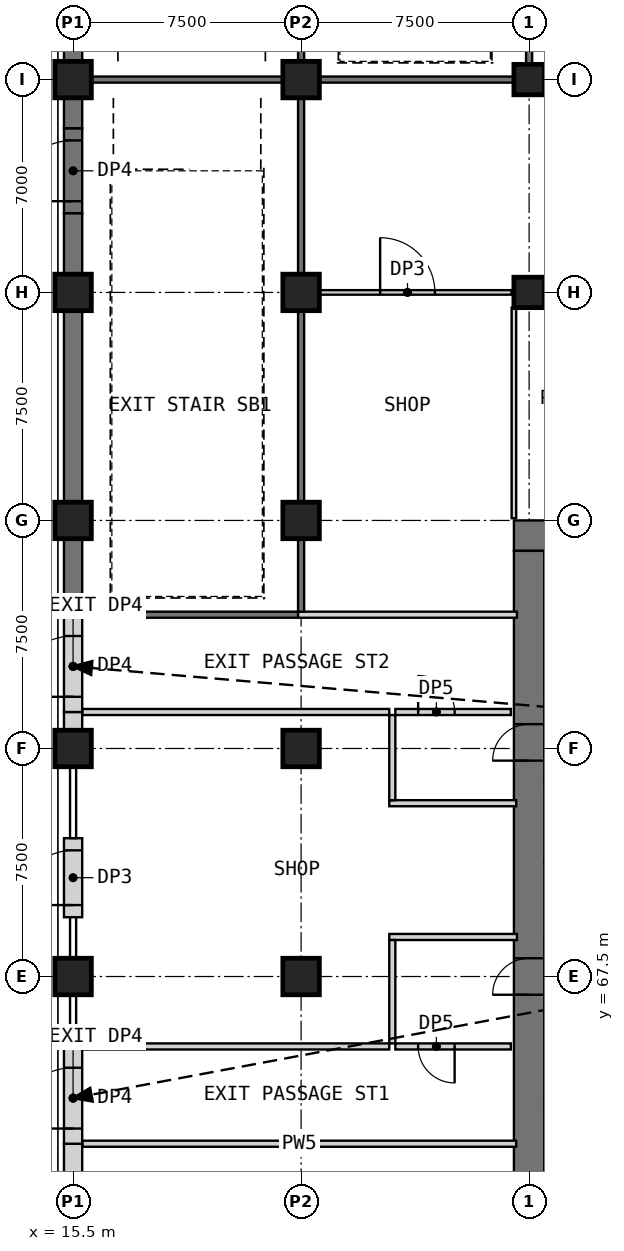
"""IFC4 building model, lengths in metres.
Left out: names, types, materials, properties, quantities, classifications, styles, units other than length and angle.
Written with IfcOpenShell. Run it as: python <this file> out.ifc"""

import sys

from ifc_helpers import new_model, si_unit, direction, frame, frame_2d, origin, origin_2d, place, context, subcontext, project, spatial, rectangle, extrude, element, fill, save


model = new_model("IFC4")
c1 = context("Model", 3, precision=1e-05, world=origin(), true_north=direction((0.0, 1.0)))
c2 = subcontext(c1, "Body", "Model", "MODEL_VIEW")
j1 = project(units=[si_unit("LENGTHUNIT", "METRE"), si_unit("PLANEANGLEUNIT", "RADIAN")], contexts=[c1])
p1 = place(None, origin())
s1 = spatial("IfcSite", under=j1, at=p1, CompositionType="ELEMENT")
p2 = place(p1, origin())
s2 = spatial("IfcBuilding", under=s1, at=p2, CompositionType="ELEMENT")
p3 = place(p2, origin())
s3 = spatial("IfcBuildingStorey", under=s2, at=p3, CompositionType="ELEMENT", Elevation=0.0)
for number, where, z_axis, x_axis in (
    (1, (30.5, 90.0, 0.0), (0.0, 0.0, 1.0), (1.0, 0.0, 0.0)),
    (2, (30.5, 97.0, 0.0), (0.0, 0.0, 1.0), (1.0, 0.0, 0.0)),
):
    element("IfcColumn", number, at=place(p3, frame(where, z_axis=z_axis, x_axis=x_axis)), inside=s3, PredefinedType="COLUMN", context=c2, shape_type="SweptSolid", body=[
        extrude(rectangle(XDim=1.0, YDim=1.0, at=origin_2d()), origin(), (0.0, 0.0, 1.0), 8.0),
    ])
for number, where, z_axis, x_axis in (
    (3, (15.5, 67.5, 0.0), (0.0, 0.0, 1.0), (1.0, 0.0, 0.0)),
    (4, (15.5, 75.0, 0.0), (0.0, 0.0, 1.0), (1.0, 0.0, 0.0)),
    (5, (15.5, 82.5, 0.0), (0.0, 0.0, 1.0), (1.0, 0.0, 0.0)),
    (6, (15.5, 90.0, 0.0), (0.0, 0.0, 1.0), (1.0, 0.0, 0.0)),
    (7, (15.5, 97.0, 0.0), (0.0, 0.0, 1.0), (1.0, 0.0, 0.0)),
    (8, (23.0, 67.5, 0.0), (0.0, 0.0, 1.0), (1.0, 0.0, 0.0)),
    (9, (23.0, 75.0, 0.0), (0.0, 0.0, 1.0), (1.0, 0.0, 0.0)),
    (10, (23.0, 82.5, 0.0), (0.0, 0.0, 1.0), (1.0, 0.0, 0.0)),
    (11, (23.0, 90.0, 0.0), (0.0, 0.0, 1.0), (1.0, 0.0, 0.0)),
    (12, (23.0, 97.0, 0.0), (0.0, 0.0, 1.0), (1.0, 0.0, 0.0)),
):
    element("IfcColumn", number, at=place(p3, frame(where, z_axis=z_axis, x_axis=x_axis)), inside=s3, PredefinedType="COLUMN", context=c2, shape_type="SweptSolid", body=[
        extrude(rectangle(XDim=1.2, YDim=1.2, at=origin_2d()), origin(), (0.0, 0.0, 1.0), 8.0),
    ])
p4 = place(p3, frame((30.0, 82.0, 0.0), z_axis=(0.0, 0.0, 1.0), x_axis=(1.0, 0.0, 0.0)))
e13 = element("IfcWall", 13, at=p4, inside=s3, PredefinedType="SHEAR", context=c2, shape_type="SweptSolid", body=[
    extrude(rectangle(XDim=30.0, YDim=1.0, at=frame_2d((15.0, 0.0))), origin(), (0.0, 0.0, 1.0), 8.0),
])
p5 = place(p3, frame((30.5, 61.0, 0.0), z_axis=(0.0, 0.0, 1.0), x_axis=(0.0, 1.0, 0.0)))
e14 = element("IfcWall", 14, at=p5, inside=s3, PredefinedType="SHEAR", context=c2, shape_type="SweptSolid", body=[
    extrude(rectangle(XDim=20.5, YDim=1.0, at=frame_2d((10.25, 0.0))), origin(), (0.0, 0.0, 1.0), 8.0),
])
p6 = place(p5, frame((5.9, 0.0, 0.0)))
e15 = element("IfcOpeningElement", 15, at=p6, cuts=e14, PredefinedType="OPENING", context=c2, shape_type="SweptSolid", body=[
    extrude(rectangle(XDim=1.2, YDim=2.1, at=frame_2d((0.6, 1.05))), frame((0.0, 0.51, 0.0), z_axis=(0.0, -1.0, 0.0), x_axis=(1.0, 0.0, 0.0)), (0.0, 0.0, 1.0), 1.02),
])
p7 = place(p5, frame((13.6, 0.0, 0.0)))
e16 = element("IfcOpeningElement", 16, at=p7, cuts=e14, PredefinedType="OPENING", context=c2, shape_type="SweptSolid", body=[
    extrude(rectangle(XDim=1.2, YDim=2.1, at=frame_2d((0.6, 1.05))), frame((0.0, 0.51, 0.0), z_axis=(0.0, -1.0, 0.0), x_axis=(1.0, 0.0, 0.0)), (0.0, 0.0, 1.0), 1.02),
])
p8 = place(p3, frame((15.8, 62.0, 0.0), z_axis=(0.0, 0.0, 1.0), x_axis=(1.0, 0.0, 0.0)))
e17 = element("IfcWall", 17, at=p8, inside=s3, PredefinedType="PARTITIONING", context=c2, shape_type="SweptSolid", body=[
    extrude(rectangle(XDim=14.275, YDim=0.2, at=frame_2d((7.137, 0.0))), origin(), (0.0, 0.0, 1.0), 7.7),
])
p9 = place(p3, frame((15.8, 65.2, 0.0), z_axis=(0.0, 0.0, 1.0), x_axis=(1.0, 0.0, 0.0)))
e18 = element("IfcWall", 18, at=p9, inside=s3, PredefinedType="PARTITIONING", context=c2, shape_type="SweptSolid", body=[
    extrude(rectangle(XDim=10.1, YDim=0.2, at=frame_2d((5.05, 0.0))), origin(), (0.0, 0.0, 1.0), 7.7),
])
p10 = place(p3, frame((29.9, 65.2, 0.0), z_axis=(0.0, 0.0, 1.0), x_axis=(-1.0, 0.0, 0.0)))
e19 = element("IfcWall", 19, at=p10, inside=s3, PredefinedType="PARTITIONING", context=c2, shape_type="SweptSolid", body=[
    extrude(rectangle(XDim=3.8, YDim=0.2, at=frame_2d((1.9, 0.0))), origin(), (0.0, 0.0, 1.0), 7.7),
])
p11 = place(p10, frame((1.85, 0.0, 0.0)))
e20 = element("IfcOpeningElement", 20, at=p11, cuts=e19, PredefinedType="OPENING", context=c2, shape_type="SweptSolid", body=[
    extrude(rectangle(XDim=1.2, YDim=2.1, at=frame_2d((0.6, 1.05))), frame((0.0, 0.11, 0.0), z_axis=(0.0, -1.0, 0.0), x_axis=(1.0, 0.0, 0.0)), (0.0, 0.0, 1.0), 0.22),
])
p12 = place(p3, frame((15.8, 76.2, 0.0), z_axis=(0.0, 0.0, 1.0), x_axis=(1.0, 0.0, 0.0)))
e21 = element("IfcWall", 21, at=p12, inside=s3, PredefinedType="PARTITIONING", context=c2, shape_type="SweptSolid", body=[
    extrude(rectangle(XDim=10.1, YDim=0.2, at=frame_2d((5.05, 0.0))), origin(), (0.0, 0.0, 1.0), 7.7),
])
p13 = place(p3, frame((26.1, 76.2, 0.0), z_axis=(0.0, 0.0, 1.0), x_axis=(1.0, 0.0, 0.0)))
e22 = element("IfcWall", 22, at=p13, inside=s3, PredefinedType="PARTITIONING", context=c2, shape_type="SweptSolid", body=[
    extrude(rectangle(XDim=3.8, YDim=0.2, at=frame_2d((1.9, 0.0))), origin(), (0.0, 0.0, 1.0), 7.7),
])
p14 = place(p13, frame((0.75, 0.0, 0.0)))
e23 = element("IfcOpeningElement", 23, at=p14, cuts=e22, PredefinedType="OPENING", context=c2, shape_type="SweptSolid", body=[
    extrude(rectangle(XDim=1.2, YDim=2.1, at=frame_2d((0.6, 1.05))), frame((0.0, 0.11, 0.0), z_axis=(0.0, -1.0, 0.0), x_axis=(1.0, 0.0, 0.0)), (0.0, 0.0, 1.0), 0.22),
])
p15 = place(p3, frame((25.9, 68.8, 0.0), z_axis=(0.0, 0.0, 1.0), x_axis=(1.0, 0.0, 0.0)))
e24 = element("IfcWall", 24, at=p15, inside=s3, PredefinedType="PARTITIONING", context=c2, shape_type="SweptSolid", body=[
    extrude(rectangle(XDim=4.2, YDim=0.2, at=frame_2d((2.1, 0.0))), origin(), (0.0, 0.0, 1.0), 7.7),
])
p16 = place(p3, frame((25.9, 73.2, 0.0), z_axis=(0.0, 0.0, 1.0), x_axis=(1.0, 0.0, 0.0)))
e25 = element("IfcWall", 25, at=p16, inside=s3, PredefinedType="PARTITIONING", context=c2, shape_type="SweptSolid", body=[
    extrude(rectangle(XDim=4.175, YDim=0.2, at=frame_2d((2.087, 0.0))), origin(), (0.0, 0.0, 1.0), 7.7),
])
p17 = place(p3, frame((15.8, 79.4, 0.0), z_axis=(0.0, 0.0, 1.0), x_axis=(1.0, 0.0, 0.0)))
e26 = element("IfcWall", 26, at=p17, inside=s3, PredefinedType="SHEAR", context=c2, shape_type="SweptSolid", body=[
    extrude(rectangle(XDim=7.3, YDim=0.2, at=frame_2d((3.65, 0.0))), origin(), (0.0, 0.0, 1.0), 7.7),
])
p18 = place(p3, frame((22.9, 79.4, 0.0), z_axis=(0.0, 0.0, 1.0), x_axis=(1.0, 0.0, 0.0)))
e27 = element("IfcWall", 27, at=p18, inside=s3, PredefinedType="PARTITIONING", context=c2, shape_type="SweptSolid", body=[
    extrude(rectangle(XDim=7.2, YDim=0.2, at=frame_2d((3.6, 0.0))), origin(), (0.0, 0.0, 1.0), 7.7),
])
p19 = place(p3, frame((16.1, 97.0, 0.0), z_axis=(0.0, 0.0, 1.0), x_axis=(1.0, 0.0, 0.0)))
e28 = element("IfcWall", 28, at=p19, inside=s3, PredefinedType="SHEAR", context=c2, shape_type="SweptSolid", body=[
    extrude(rectangle(XDim=6.3, YDim=0.2, at=frame_2d((3.15, 0.0))), origin(), (0.0, 0.0, 1.0), 7.7),
])
p20 = place(p3, frame((23.6, 97.0, 0.0), z_axis=(0.0, 0.0, 1.0), x_axis=(1.0, 0.0, 0.0)))
e29 = element("IfcWall", 29, at=p20, inside=s3, PredefinedType="SHEAR", context=c2, shape_type="SweptSolid", body=[
    extrude(rectangle(XDim=6.4, YDim=0.2, at=frame_2d((3.2, 0.0))), origin(), (0.0, 0.0, 1.0), 7.7),
])
p21 = place(p3, frame((23.6, 90.0, 0.0), z_axis=(0.0, 0.0, 1.0), x_axis=(1.0, 0.0, 0.0)))
e30 = element("IfcWall", 30, at=p21, inside=s3, PredefinedType="PARTITIONING", context=c2, shape_type="SweptSolid", body=[
    extrude(rectangle(XDim=6.325, YDim=0.15, at=frame_2d((3.163, 0.0))), origin(), (0.0, 0.0, 1.0), 7.7),
])
p22 = place(p21, frame((2.0, 0.0, 0.0)))
e31 = element("IfcOpeningElement", 31, at=p22, cuts=e30, PredefinedType="OPENING", context=c2, shape_type="SweptSolid", body=[
    extrude(rectangle(XDim=1.8, YDim=2.4, at=frame_2d((0.9, 1.2))), frame((0.0, 0.085, 0.0), z_axis=(0.0, -1.0, 0.0), x_axis=(1.0, 0.0, 0.0)), (0.0, 0.0, 1.0), 0.17),
])
p23 = place(p3, frame((31.0, 90.0, 0.0), z_axis=(0.0, 0.0, 1.0), x_axis=(1.0, 0.0, 0.0)))
e32 = element("IfcWall", 32, at=p23, inside=s3, PredefinedType="PARTITIONING", context=c2, shape_type="SweptSolid", body=[
    extrude(rectangle(XDim=2.925, YDim=0.15, at=frame_2d((1.462, 0.0))), origin(), (0.0, 0.0, 1.0), 7.7),
])
p24 = place(p23, frame((0.5, 0.0, 0.0)))
e33 = element("IfcOpeningElement", 33, at=p24, cuts=e32, PredefinedType="OPENING", context=c2, shape_type="SweptSolid", body=[
    extrude(rectangle(XDim=1.0, YDim=2.1, at=frame_2d((0.5, 1.05))), frame((0.0, 0.085, 0.0), z_axis=(0.0, -1.0, 0.0), x_axis=(1.0, 0.0, 0.0)), (0.0, 0.0, 1.0), 0.17),
])
p25 = place(p3, frame((15.5, 60.6, 0.0), z_axis=(0.0, 0.0, 1.0), x_axis=(0.0, 1.0, 0.0)))
e34 = element("IfcWall", 34, at=p25, inside=s3, PredefinedType="PARTITIONING", context=c2, shape_type="SweptSolid", body=[
    extrude(rectangle(XDim=1.4, YDim=0.6, at=frame_2d((0.7, 0.0))), origin(), (0.0, 0.0, 1.0), 7.1),
])
p26 = place(p3, frame((15.5, 62.0, 0.0), z_axis=(0.0, 0.0, 1.0), x_axis=(0.0, 1.0, 0.0)))
e35 = element("IfcWall", 35, at=p26, inside=s3, PredefinedType="PARTITIONING", context=c2, shape_type="SweptSolid", body=[
    extrude(rectangle(XDim=3.2, YDim=0.6, at=frame_2d((1.6, 0.0))), origin(), (0.0, 0.0, 1.0), 7.1),
])
p27 = place(p26, frame((0.5, 0.0, 0.0)))
e36 = element("IfcOpeningElement", 36, at=p27, cuts=e35, PredefinedType="OPENING", context=c2, shape_type="SweptSolid", body=[
    extrude(rectangle(XDim=2.0, YDim=2.4, at=frame_2d((1.0, 1.2))), frame((0.0, 0.31, 0.0), z_axis=(0.0, -1.0, 0.0), x_axis=(1.0, 0.0, 0.0)), (0.0, 0.0, 1.0), 0.62),
])
p28 = place(p3, frame((15.5, 69.45, 0.0), z_axis=(0.0, 0.0, 1.0), x_axis=(0.0, 1.0, 0.0)))
e37 = element("IfcWall", 37, at=p28, inside=s3, PredefinedType="PARTITIONING", context=c2, shape_type="SweptSolid", body=[
    extrude(rectangle(XDim=2.6, YDim=0.6, at=frame_2d((1.3, 0.0))), origin(), (0.0, 0.0, 1.0), 7.1),
])
p29 = place(p28, frame((0.4, 0.0, 0.0)))
e38 = element("IfcOpeningElement", 38, at=p29, cuts=e37, PredefinedType="OPENING", context=c2, shape_type="SweptSolid", body=[
    extrude(rectangle(XDim=1.8, YDim=2.4, at=frame_2d((0.9, 1.2))), frame((0.0, 0.31, 0.0), z_axis=(0.0, -1.0, 0.0), x_axis=(1.0, 0.0, 0.0)), (0.0, 0.0, 1.0), 0.62),
])
p30 = place(p3, frame((15.5, 75.6, 0.0), z_axis=(0.0, 0.0, 1.0), x_axis=(0.0, 1.0, 0.0)))
e39 = element("IfcWall", 39, at=p30, inside=s3, PredefinedType="PARTITIONING", context=c2, shape_type="SweptSolid", body=[
    extrude(rectangle(XDim=0.6, YDim=0.6, at=frame_2d((0.3, 0.0))), origin(), (0.0, 0.0, 1.0), 7.1),
])
p31 = place(p3, frame((15.5, 76.2, 0.0), z_axis=(0.0, 0.0, 1.0), x_axis=(0.0, 1.0, 0.0)))
e40 = element("IfcWall", 40, at=p31, inside=s3, PredefinedType="PARTITIONING", context=c2, shape_type="SweptSolid", body=[
    extrude(rectangle(XDim=3.2, YDim=0.6, at=frame_2d((1.6, 0.0))), origin(), (0.0, 0.0, 1.0), 7.1),
])
p32 = place(p31, frame((0.5, 0.0, 0.0)))
e41 = element("IfcOpeningElement", 41, at=p32, cuts=e40, PredefinedType="OPENING", context=c2, shape_type="SweptSolid", body=[
    extrude(rectangle(XDim=2.0, YDim=2.4, at=frame_2d((1.0, 1.2))), frame((0.0, 0.31, 0.0), z_axis=(0.0, -1.0, 0.0), x_axis=(1.0, 0.0, 0.0)), (0.0, 0.0, 1.0), 0.62),
])
p33 = place(p3, frame((15.5, 79.4, 0.0), z_axis=(0.0, 0.0, 1.0), x_axis=(0.0, 1.0, 0.0)))
e42 = element("IfcWall", 42, at=p33, inside=s3, PredefinedType="PARTITIONING", context=c2, shape_type="SweptSolid", body=[
    extrude(rectangle(XDim=2.5, YDim=0.6, at=frame_2d((1.25, 0.0))), origin(), (0.0, 0.0, 1.0), 7.1),
])
p34 = place(p3, frame((15.5, 83.1, 0.0), z_axis=(0.0, 0.0, 1.0), x_axis=(0.0, 1.0, 0.0)))
e43 = element("IfcWall", 43, at=p34, inside=s3, PredefinedType="PARTITIONING", context=c2, shape_type="SweptSolid", body=[
    extrude(rectangle(XDim=6.3, YDim=0.6, at=frame_2d((3.15, 0.0))), origin(), (0.0, 0.0, 1.0), 7.1),
])
p35 = place(p3, frame((15.5, 92.6, 0.0), z_axis=(0.0, 0.0, 1.0), x_axis=(0.0, 1.0, 0.0)))
e44 = element("IfcWall", 44, at=p35, inside=s3, PredefinedType="PARTITIONING", context=c2, shape_type="SweptSolid", body=[
    extrude(rectangle(XDim=2.8, YDim=0.6, at=frame_2d((1.4, 0.0))), origin(), (0.0, 0.0, 1.0), 7.1),
])
p36 = place(p35, frame((0.4, 0.0, 0.0)))
e45 = element("IfcOpeningElement", 45, at=p36, cuts=e44, PredefinedType="OPENING", context=c2, shape_type="SweptSolid", body=[
    extrude(rectangle(XDim=2.0, YDim=2.4, at=frame_2d((1.0, 1.2))), frame((0.0, 0.31, 0.0), z_axis=(0.0, -1.0, 0.0), x_axis=(1.0, 0.0, 0.0)), (0.0, 0.0, 1.0), 0.62),
])
p37 = place(p3, frame((15.5, 90.6, 0.0), z_axis=(0.0, 0.0, 1.0), x_axis=(0.0, 1.0, 0.0)))
e46 = element("IfcWall", 46, at=p37, inside=s3, PredefinedType="PARTITIONING", context=c2, shape_type="SweptSolid", body=[
    extrude(rectangle(XDim=2.0, YDim=0.6, at=frame_2d((1.0, 0.0))), origin(), (0.0, 0.0, 1.0), 7.1),
])
p38 = place(p3, frame((15.5, 95.4, 0.0), z_axis=(0.0, 0.0, 1.0), x_axis=(0.0, 1.0, 0.0)))
e47 = element("IfcWall", 47, at=p38, inside=s3, PredefinedType="PARTITIONING", context=c2, shape_type="SweptSolid", body=[
    extrude(rectangle(XDim=1.0, YDim=0.6, at=frame_2d((0.5, 0.0))), origin(), (0.0, 0.0, 1.0), 7.1),
])
p39 = place(p3, frame((15.5, 97.6, 0.0), z_axis=(0.0, 0.0, 1.0), x_axis=(0.0, 1.0, 0.0)))
e48 = element("IfcWall", 48, at=p39, inside=s3, PredefinedType="PARTITIONING", context=c2, shape_type="SweptSolid", body=[
    extrude(rectangle(XDim=1.85, YDim=0.6, at=frame_2d((0.925, 0.0))), origin(), (0.0, 0.0, 1.0), 7.1),
])
p40 = place(p3, frame((23.0, 79.5, 0.0), z_axis=(0.0, 0.0, 1.0), x_axis=(0.0, 1.0, 0.0)))
e49 = element("IfcWall", 49, at=p40, inside=s3, PredefinedType="SHEAR", context=c2, shape_type="SweptSolid", body=[
    extrude(rectangle(XDim=2.4, YDim=0.2, at=frame_2d((1.2, 0.0))), origin(), (0.0, 0.0, 1.0), 7.7),
])
p41 = place(p3, frame((23.0, 83.1, 0.0), z_axis=(0.0, 0.0, 1.0), x_axis=(0.0, 1.0, 0.0)))
e50 = element("IfcWall", 50, at=p41, inside=s3, PredefinedType="SHEAR", context=c2, shape_type="SweptSolid", body=[
    extrude(rectangle(XDim=6.3, YDim=0.2, at=frame_2d((3.15, 0.0))), origin(), (0.0, 0.0, 1.0), 7.7),
])
p42 = place(p3, frame((23.0, 90.6, 0.0), z_axis=(0.0, 0.0, 1.0), x_axis=(0.0, 1.0, 0.0)))
e51 = element("IfcWall", 51, at=p42, inside=s3, PredefinedType="SHEAR", context=c2, shape_type="SweptSolid", body=[
    extrude(rectangle(XDim=5.8, YDim=0.2, at=frame_2d((2.9, 0.0))), origin(), (0.0, 0.0, 1.0), 7.7),
])
p43 = place(p3, frame((23.0, 97.6, 0.0), z_axis=(0.0, 0.0, 1.0), x_axis=(0.0, 1.0, 0.0)))
e52 = element("IfcWall", 52, at=p43, inside=s3, PredefinedType="SHEAR", context=c2, shape_type="SweptSolid", body=[
    extrude(rectangle(XDim=6.3, YDim=0.2, at=frame_2d((3.15, 0.0))), origin(), (0.0, 0.0, 1.0), 7.7),
])
p44 = place(p3, frame((30.5, 97.5, 0.0), z_axis=(0.0, 0.0, 1.0), x_axis=(0.0, 1.0, 0.0)))
e53 = element("IfcWall", 53, at=p44, inside=s3, PredefinedType="SHEAR", context=c2, shape_type="SweptSolid", body=[
    extrude(rectangle(XDim=6.4, YDim=0.2, at=frame_2d((3.2, 0.0))), origin(), (0.0, 0.0, 1.0), 7.7),
])
p45 = place(p3, frame((30.0, 82.575, 0.0), z_axis=(0.0, 0.0, 1.0), x_axis=(0.0, 1.0, 0.0)))
e54 = element("IfcWall", 54, at=p45, inside=s3, PredefinedType="PARTITIONING", context=c2, shape_type="SweptSolid", body=[
    extrude(rectangle(XDim=6.925, YDim=0.15, at=frame_2d((3.462, 0.0))), origin(), (0.0, 0.0, 1.0), 7.7),
])
p46 = place(p3, frame((26.0, 65.3, 0.0), z_axis=(0.0, 0.0, 1.0), x_axis=(0.0, 1.0, 0.0)))
e55 = element("IfcWall", 55, at=p46, inside=s3, PredefinedType="PARTITIONING", context=c2, shape_type="SweptSolid", body=[
    extrude(rectangle(XDim=3.4, YDim=0.2, at=frame_2d((1.7, 0.0))), origin(), (0.0, 0.0, 1.0), 7.7),
])
p47 = place(p3, frame((26.0, 73.3, 0.0), z_axis=(0.0, 0.0, 1.0), x_axis=(0.0, 1.0, 0.0)))
e56 = element("IfcWall", 56, at=p47, inside=s3, PredefinedType="PARTITIONING", context=c2, shape_type="SweptSolid", body=[
    extrude(rectangle(XDim=2.8, YDim=0.2, at=frame_2d((1.4, 0.0))), origin(), (0.0, 0.0, 1.0), 7.7),
])
p48 = place(p6, origin())
e57 = element("IfcDoor", 57, at=p48, inside=s3, OperationType="SINGLE_SWING_LEFT", PredefinedType="DOOR", context=c2, shape_type="SweptSolid", body=[
    extrude(rectangle(XDim=1.2, YDim=2.1, at=frame_2d((0.6, 1.05))), frame((0.0, 0.025, 0.0), z_axis=(0.0, -1.0, 0.0), x_axis=(1.0, 0.0, 0.0)), (0.0, 0.0, 1.0), 0.05),
])
fill(e15, e57)
p49 = place(p7, origin())
e58 = element("IfcDoor", 58, at=p49, inside=s3, OperationType="SINGLE_SWING_RIGHT", PredefinedType="DOOR", context=c2, shape_type="SweptSolid", body=[
    extrude(rectangle(XDim=1.2, YDim=2.1, at=frame_2d((0.6, 1.05))), frame((0.0, 0.025, 0.0), z_axis=(0.0, -1.0, 0.0), x_axis=(1.0, 0.0, 0.0)), (0.0, 0.0, 1.0), 0.05),
])
fill(e16, e58)
p50 = place(p11, origin())
e59 = element("IfcDoor", 59, at=p50, inside=s3, OperationType="SINGLE_SWING_LEFT", PredefinedType="DOOR", context=c2, shape_type="SweptSolid", body=[
    extrude(rectangle(XDim=1.2, YDim=2.1, at=frame_2d((0.6, 1.05))), frame((0.0, 0.025, 0.0), z_axis=(0.0, -1.0, 0.0), x_axis=(1.0, 0.0, 0.0)), (0.0, 0.0, 1.0), 0.05),
])
fill(e20, e59)
p51 = place(p14, origin())
e60 = element("IfcDoor", 60, at=p51, inside=s3, OperationType="SINGLE_SWING_LEFT", PredefinedType="DOOR", context=c2, shape_type="SweptSolid", body=[
    extrude(rectangle(XDim=1.2, YDim=2.1, at=frame_2d((0.6, 1.05))), frame((0.0, 0.025, 0.0), z_axis=(0.0, -1.0, 0.0), x_axis=(1.0, 0.0, 0.0)), (0.0, 0.0, 1.0), 0.05),
])
fill(e23, e60)
p52 = place(p22, origin())
e61 = element("IfcDoor", 61, at=p52, inside=s3, OperationType="SINGLE_SWING_LEFT", PredefinedType="DOOR", context=c2, shape_type="SweptSolid", body=[
    extrude(rectangle(XDim=1.8, YDim=2.4, at=frame_2d((0.9, 1.2))), frame((0.0, 0.025, 0.0), z_axis=(0.0, -1.0, 0.0), x_axis=(1.0, 0.0, 0.0)), (0.0, 0.0, 1.0), 0.05),
])
fill(e31, e61)
p53 = place(p27, origin())
e62 = element("IfcDoor", 62, at=p53, inside=s3, OperationType="SINGLE_SWING_LEFT", PredefinedType="DOOR", context=c2, shape_type="SweptSolid", body=[
    extrude(rectangle(XDim=2.0, YDim=2.4, at=frame_2d((1.0, 1.2))), frame((0.0, 0.025, 0.0), z_axis=(0.0, -1.0, 0.0), x_axis=(1.0, 0.0, 0.0)), (0.0, 0.0, 1.0), 0.05),
])
fill(e36, e62)
p54 = place(p29, origin())
e63 = element("IfcDoor", 63, at=p54, inside=s3, OperationType="SINGLE_SWING_LEFT", PredefinedType="DOOR", context=c2, shape_type="SweptSolid", body=[
    extrude(rectangle(XDim=1.8, YDim=2.4, at=frame_2d((0.9, 1.2))), frame((0.0, 0.025, 0.0), z_axis=(0.0, -1.0, 0.0), x_axis=(1.0, 0.0, 0.0)), (0.0, 0.0, 1.0), 0.05),
])
fill(e38, e63)
p55 = place(p32, origin())
e64 = element("IfcDoor", 64, at=p55, inside=s3, OperationType="SINGLE_SWING_LEFT", PredefinedType="DOOR", context=c2, shape_type="SweptSolid", body=[
    extrude(rectangle(XDim=2.0, YDim=2.4, at=frame_2d((1.0, 1.2))), frame((0.0, 0.025, 0.0), z_axis=(0.0, -1.0, 0.0), x_axis=(1.0, 0.0, 0.0)), (0.0, 0.0, 1.0), 0.05),
])
fill(e41, e64)
p56 = place(p36, origin())
e65 = element("IfcDoor", 65, at=p56, inside=s3, OperationType="SINGLE_SWING_LEFT", PredefinedType="DOOR", context=c2, shape_type="SweptSolid", body=[
    extrude(rectangle(XDim=2.0, YDim=2.4, at=frame_2d((1.0, 1.2))), frame((0.0, 0.025, 0.0), z_axis=(0.0, -1.0, 0.0), x_axis=(1.0, 0.0, 0.0)), (0.0, 0.0, 1.0), 0.05),
])
fill(e45, e65)
save(model, sys.argv[1])
